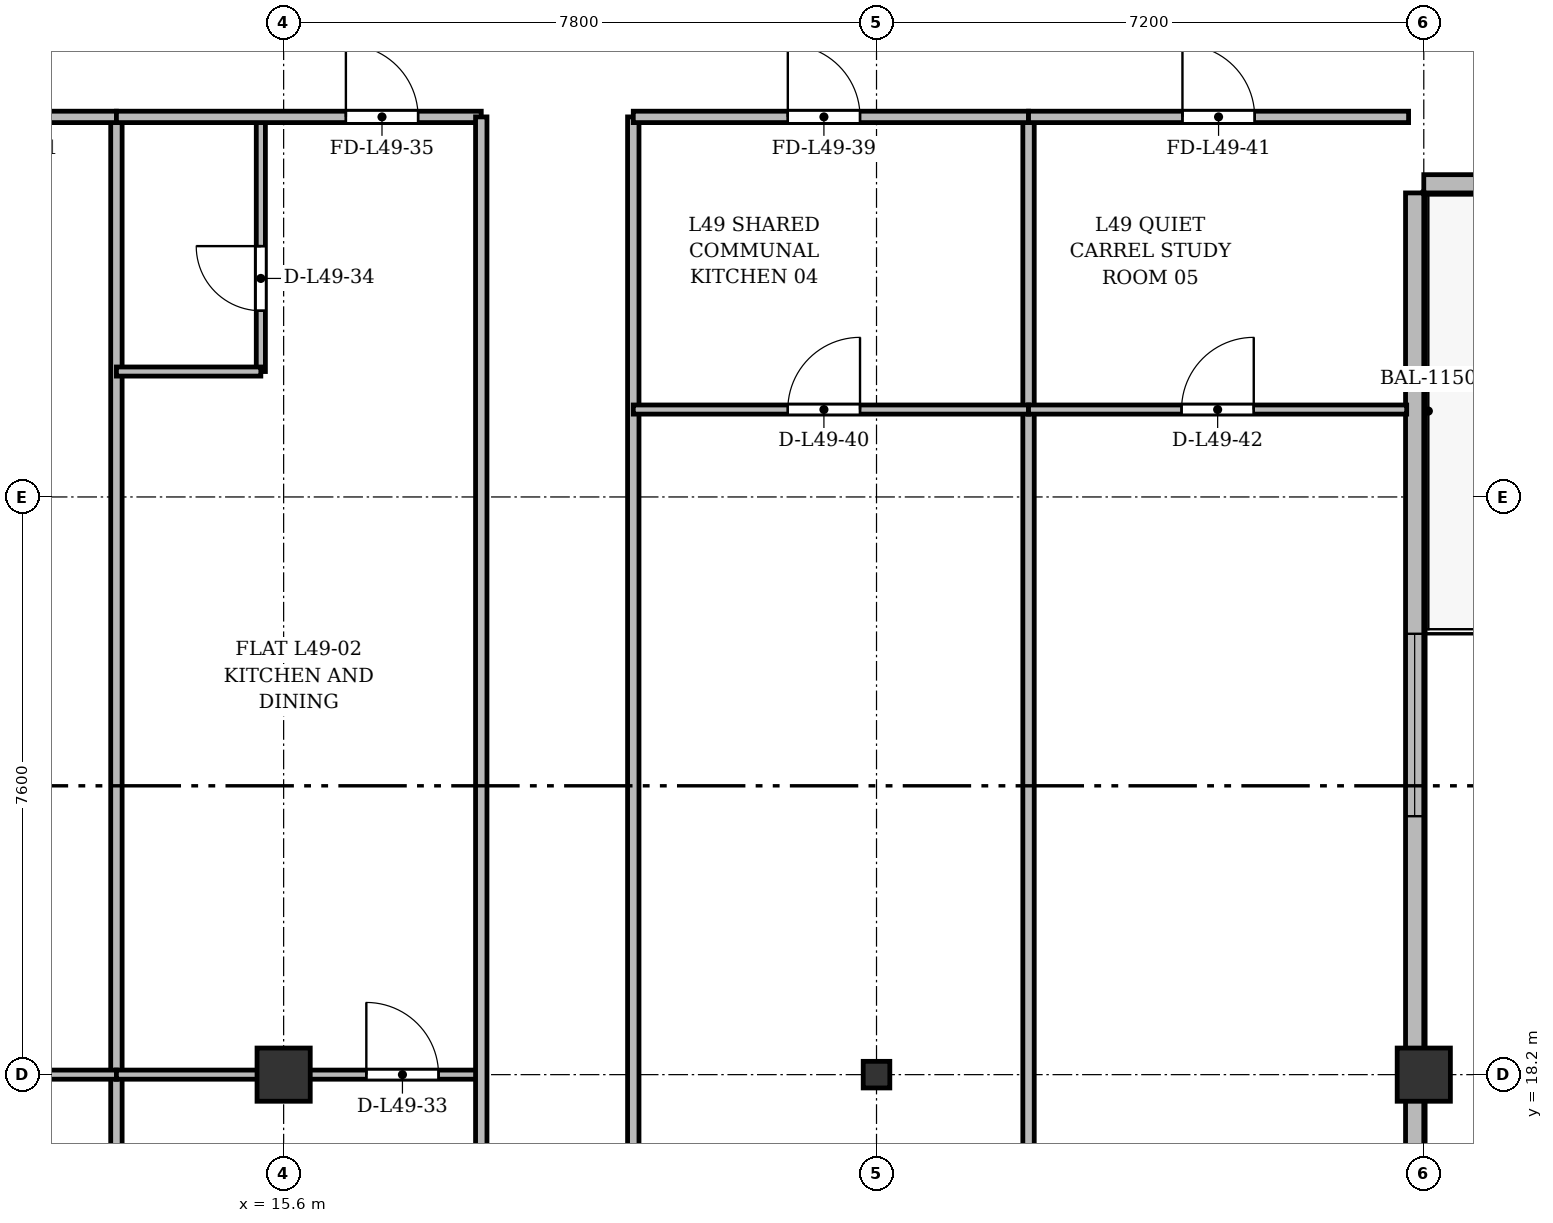
"""IFC4 building model, lengths in metres.
Left out: names, types, materials, properties, quantities, classifications, styles, units other than length and angle.
Written with IfcOpenShell. Run it as: python <this file> out.ifc"""

import sys

from ifc_helpers import new_model, si_unit, direction, frame, frame_2d, origin, origin_2d, place, context, subcontext, project, spatial, rectangle, i_section, extrude, source, transform, mapped, element, fill, save


model = new_model("IFC4")
c1 = context("Model", 3, precision=1e-05, world=origin(), true_north=direction((0.0, 1.0)))
c2 = subcontext(c1, "Body", "Model", "MODEL_VIEW")
j1 = project(units=[si_unit("LENGTHUNIT", "METRE"), si_unit("PLANEANGLEUNIT", "RADIAN")], contexts=[c1])
p1 = place(None, origin())
s1 = spatial("IfcSite", under=j1, at=p1, CompositionType="ELEMENT")
p2 = place(p1, origin())
s2 = spatial("IfcBuilding", under=s1, at=p2, CompositionType="ELEMENT")
p3 = place(p2, frame((0.0, 0.0, 190.5)))
s3 = spatial("IfcBuildingStorey", under=s2, at=p3, CompositionType="ELEMENT", Elevation=190.5)
m1 = source(origin(), c2, "Body", "SweptSolid", [
    extrude(rectangle(XDim=0.7, YDim=0.7, at=origin_2d()), origin(), (0.0, 0.0, 1.0), 3.6),
])
p4 = place(p3, frame((15.6, 18.2, 0.0), z_axis=(0.0, 0.0, 1.0), x_axis=(1.0, 0.0, 0.0)))
e1 = element("IfcColumn", 1, at=p4, inside=s3, PredefinedType="COLUMN", context=c2, shape_type="MappedRepresentation", body=[
    mapped(m1, transform((0.0, 0.0, 0.0), x_axis=(1.0, 0.0, 0.0), y_axis=(0.0, 1.0, 0.0), z_axis=(0.0, 0.0, 1.0), scale=1.0)),
])
m2 = source(origin(), c2, "Body", "SweptSolid", [
    extrude(i_section(OverallWidth=0.35, OverallDepth=0.35, WebThickness=0.018, FlangeThickness=0.028, at=origin_2d()), origin(), (0.0, 0.0, 1.0), 3.6),
])
p5 = place(p3, frame((23.4, 18.2, 0.0), z_axis=(0.0, 0.0, 1.0), x_axis=(1.0, 0.0, 0.0)))
e2 = element("IfcColumn", 2, at=p5, inside=s3, PredefinedType="COLUMN", context=c2, shape_type="MappedRepresentation", body=[
    mapped(m2, transform((0.0, 0.0, 0.0), x_axis=(1.0, 0.0, 0.0), y_axis=(0.0, 1.0, 0.0), z_axis=(0.0, 0.0, 1.0), scale=1.0)),
])
p6 = place(p3, frame((30.6, 18.2, 0.0), z_axis=(0.0, 0.0, 1.0), x_axis=(1.0, 0.0, 0.0)))
e3 = element("IfcColumn", 3, at=p6, inside=s3, PredefinedType="COLUMN", context=c2, shape_type="MappedRepresentation", body=[
    mapped(m1, transform((0.0, 0.0, 0.0), x_axis=(1.0, 0.0, 0.0), y_axis=(0.0, 1.0, 0.0), z_axis=(0.0, 0.0, 1.0), scale=1.0)),
])
p7 = place(p3, frame((43.8, 29.92, 0.0), z_axis=(0.0, 0.0, 1.0), x_axis=(-1.0, 0.0, 0.0)))
e4 = element("IfcWall", 4, at=p7, inside=s3, PredefinedType="SOLIDWALL", context=c2, shape_type="SweptSolid", body=[
    extrude(rectangle(XDim=13.2, YDim=0.24, at=frame_2d((6.6, 0.0))), origin(), (0.0, 0.0, 1.0), 2.86),
])
p8 = place(p7, frame((6.0, 0.0, 0.0)))
e5 = element("IfcOpeningElement", 5, at=p8, cuts=e4, PredefinedType="OPENING", context=c2, shape_type="SweptSolid", body=[
    extrude(rectangle(XDim=1.2, YDim=2.2, at=frame_2d((0.6, 1.1))), frame((0.0, 0.13, 0.0), z_axis=(0.0, -1.0, 0.0), x_axis=(1.0, 0.0, 0.0)), (0.0, 0.0, 1.0), 0.26),
])
p9 = place(p3, frame((30.48, 29.8, 0.0), z_axis=(0.0, 0.0, 1.0), x_axis=(0.0, -1.0, 0.0)))
e6 = element("IfcWall", 6, at=p9, inside=s3, PredefinedType="SOLIDWALL", context=c2, shape_type="SweptSolid", body=[
    extrude(rectangle(XDim=26.4, YDim=0.24, at=frame_2d((13.2, 0.0))), origin(), (0.0, 0.0, 1.0), 2.86),
])
p10 = place(p9, frame((20.75, 0.0, 0.92)))
e7 = element("IfcOpeningElement", 7, at=p10, cuts=e6, PredefinedType="OPENING", context=c2, shape_type="SweptSolid", body=[
    extrude(rectangle(XDim=1.2, YDim=1.65, at=frame_2d((0.6, 0.825))), frame((0.0, 0.13, 0.0), z_axis=(0.0, -1.0, 0.0), x_axis=(1.0, 0.0, 0.0)), (0.0, 0.0, 1.0), 0.26),
])
p11 = place(p9, frame((17.2, 0.0, 0.92)))
e8 = element("IfcOpeningElement", 8, at=p11, cuts=e6, PredefinedType="OPENING", context=c2, shape_type="SweptSolid", body=[
    extrude(rectangle(XDim=2.4, YDim=1.84, at=frame_2d((1.2, 0.92))), frame((0.0, 0.13, 0.0), z_axis=(0.0, -1.0, 0.0), x_axis=(1.0, 0.0, 0.0)), (0.0, 0.0, 1.0), 0.26),
])
p12 = place(p9, frame((13.0, 0.0, 0.92)))
e9 = element("IfcOpeningElement", 9, at=p12, cuts=e6, PredefinedType="OPENING", context=c2, shape_type="SweptSolid", body=[
    extrude(rectangle(XDim=2.4, YDim=1.84, at=frame_2d((1.2, 0.92))), frame((0.0, 0.13, 0.0), z_axis=(0.0, -1.0, 0.0), x_axis=(1.0, 0.0, 0.0)), (0.0, 0.0, 1.0), 0.26),
])
p13 = place(p9, frame((5.8, 0.0, 0.92)))
e10 = element("IfcOpeningElement", 10, at=p13, cuts=e6, PredefinedType="OPENING", context=c2, shape_type="SweptSolid", body=[
    extrude(rectangle(XDim=2.4, YDim=1.84, at=frame_2d((1.2, 0.92))), frame((0.0, 0.13, 0.0), z_axis=(0.0, -1.0, 0.0), x_axis=(1.0, 0.0, 0.0)), (0.0, 0.0, 1.0), 0.26),
])
for number, where, z_axis, x_axis in (
    (11, (13.4, 3.625, 0.0), (0.0, 0.0, 1.0), (0.0, 1.0, 0.0)),
    (12, (25.4, 3.625, 0.0), (0.0, 0.0, 1.0), (0.0, 1.0, 0.0)),
):
    element("IfcWall", number, at=place(p3, frame(where, z_axis=z_axis, x_axis=x_axis)), inside=s3, PredefinedType="PARTITIONING", context=c2, shape_type="SweptSolid", body=[
        extrude(rectangle(XDim=27.175, YDim=0.15, at=frame_2d((13.587, 0.0))), origin(), (0.0, 0.0, 1.0), 2.91),
    ])
p14 = place(p3, frame((8.24, 18.2, 0.0), z_axis=(0.0, 0.0, 1.0), x_axis=(1.0, 0.0, 0.0)))
e13 = element("IfcWall", 13, at=p14, inside=s3, PredefinedType="PARTITIONING", context=c2, shape_type="SweptSolid", body=[
    extrude(rectangle(XDim=5.16, YDim=0.12, at=frame_2d((2.58, 0.0))), origin(), (0.0, 0.0, 1.0), 2.91),
])
p15 = place(p14, frame((2.014, 0.0, 0.0)))
e14 = element("IfcOpeningElement", 14, at=p15, cuts=e13, PredefinedType="OPENING", context=c2, shape_type="SweptSolid", body=[
    extrude(rectangle(XDim=0.95, YDim=2.15, at=frame_2d((0.475, 1.075))), frame((0.0, 0.07, 0.0), z_axis=(0.0, -1.0, 0.0), x_axis=(1.0, 0.0, 0.0)), (0.0, 0.0, 1.0), 0.14),
])
p16 = place(p3, frame((8.225, 30.8, 0.0), z_axis=(0.0, 0.0, 1.0), x_axis=(1.0, 0.0, 0.0)))
e15 = element("IfcWall", 15, at=p16, inside=s3, PredefinedType="PARTITIONING", context=c2, shape_type="SweptSolid", body=[
    extrude(rectangle(XDim=5.175, YDim=0.15, at=frame_2d((2.587, 0.0))), origin(), (0.0, 0.0, 1.0), 2.86),
])
p17 = place(p16, frame((3.244, 0.0, 0.0)))
e16 = element("IfcOpeningElement", 16, at=p17, cuts=e15, PredefinedType="OPENING", context=c2, shape_type="SweptSolid", body=[
    extrude(rectangle(XDim=0.95, YDim=2.15, at=frame_2d((0.475, 1.075))), frame((0.0, 0.085, 0.0), z_axis=(0.0, -1.0, 0.0), x_axis=(1.0, 0.0, 0.0)), (0.0, 0.0, 1.0), 0.17),
])
p18 = place(p3, frame((13.4, 18.2, 0.0), z_axis=(0.0, 0.0, 1.0), x_axis=(1.0, 0.0, 0.0)))
e17 = element("IfcWall", 17, at=p18, inside=s3, PredefinedType="PARTITIONING", context=c2, shape_type="SweptSolid", body=[
    extrude(rectangle(XDim=4.8, YDim=0.12, at=frame_2d((2.4, 0.0))), origin(), (0.0, 0.0, 1.0), 2.91),
])
p19 = place(p18, frame((3.288, 0.0, 0.0)))
e18 = element("IfcOpeningElement", 18, at=p19, cuts=e17, PredefinedType="OPENING", context=c2, shape_type="SweptSolid", body=[
    extrude(rectangle(XDim=0.95, YDim=2.15, at=frame_2d((0.475, 1.075))), frame((0.0, 0.07, 0.0), z_axis=(0.0, -1.0, 0.0), x_axis=(1.0, 0.0, 0.0)), (0.0, 0.0, 1.0), 0.14),
])
p20 = place(p3, frame((15.3, 27.45, 0.0), z_axis=(0.0, 0.0, 1.0), x_axis=(0.0, 1.0, 0.0)))
e19 = element("IfcWall", 19, at=p20, inside=s3, PredefinedType="PARTITIONING", context=c2, shape_type="SweptSolid", body=[
    extrude(rectangle(XDim=3.35, YDim=0.12, at=frame_2d((1.675, 0.0))), origin(), (0.0, 0.0, 1.0), 3.36),
])
p21 = place(p20, frame((0.8, 0.0, 0.0)))
e20 = element("IfcOpeningElement", 20, at=p21, cuts=e19, PredefinedType="OPENING", context=c2, shape_type="SweptSolid", body=[
    extrude(rectangle(XDim=0.85, YDim=2.1, at=frame_2d((0.425, 1.05))), frame((0.0, 0.07, 0.0), z_axis=(0.0, -1.0, 0.0), x_axis=(1.0, 0.0, 0.0)), (0.0, 0.0, 1.0), 0.14),
])
p22 = place(p3, frame((13.4, 27.45, 0.0), z_axis=(0.0, 0.0, 1.0), x_axis=(1.0, 0.0, 0.0)))
e21 = element("IfcWall", 21, at=p22, inside=s3, PredefinedType="PARTITIONING", context=c2, shape_type="SweptSolid", body=[
    extrude(rectangle(XDim=1.9, YDim=0.12, at=frame_2d((0.95, 0.0))), origin(), (0.0, 0.0, 1.0), 3.36),
])
p23 = place(p3, frame((13.4, 30.8, 0.0), z_axis=(0.0, 0.0, 1.0), x_axis=(1.0, 0.0, 0.0)))
e22 = element("IfcWall", 22, at=p23, inside=s3, PredefinedType="PARTITIONING", context=c2, shape_type="SweptSolid", body=[
    extrude(rectangle(XDim=4.8, YDim=0.15, at=frame_2d((2.4, 0.0))), origin(), (0.0, 0.0, 1.0), 2.86),
])
p24 = place(p23, frame((3.019, 0.0, 0.0)))
e23 = element("IfcOpeningElement", 23, at=p24, cuts=e22, PredefinedType="OPENING", context=c2, shape_type="SweptSolid", body=[
    extrude(rectangle(XDim=0.95, YDim=2.15, at=frame_2d((0.475, 1.075))), frame((0.0, 0.085, 0.0), z_axis=(0.0, -1.0, 0.0), x_axis=(1.0, 0.0, 0.0)), (0.0, 0.0, 1.0), 0.17),
])
for number, where, z_axis, x_axis in (
    (24, (18.2, 3.625, 0.0), (0.0, 0.0, 1.0), (0.0, 1.0, 0.0)),
    (25, (20.2, 3.625, 0.0), (0.0, 0.0, 1.0), (0.0, 1.0, 0.0)),
):
    element("IfcWall", number, at=place(p3, frame(where, z_axis=z_axis, x_axis=x_axis)), inside=s3, PredefinedType="PARTITIONING", context=c2, shape_type="SweptSolid", body=[
        extrude(rectangle(XDim=27.175, YDim=0.15, at=frame_2d((13.587, 0.0))), origin(), (0.0, 0.0, 1.0), 2.91),
    ])
p25 = place(p3, frame((20.2, 30.8, 0.0), z_axis=(0.0, 0.0, 1.0), x_axis=(1.0, 0.0, 0.0)))
e26 = element("IfcWall", 26, at=p25, inside=s3, PredefinedType="PARTITIONING", context=c2, shape_type="SweptSolid", body=[
    extrude(rectangle(XDim=5.2, YDim=0.15, at=frame_2d((2.6, 0.0))), origin(), (0.0, 0.0, 1.0), 2.86),
])
p26 = place(p25, frame((2.033, 0.0, 0.0)))
e27 = element("IfcOpeningElement", 27, at=p26, cuts=e26, PredefinedType="OPENING", context=c2, shape_type="SweptSolid", body=[
    extrude(rectangle(XDim=0.95, YDim=2.15, at=frame_2d((0.475, 1.075))), frame((0.0, 0.085, 0.0), z_axis=(0.0, -1.0, 0.0), x_axis=(1.0, 0.0, 0.0)), (0.0, 0.0, 1.0), 0.17),
])
p27 = place(p3, frame((20.2, 26.95, 0.0), z_axis=(0.0, 0.0, 1.0), x_axis=(1.0, 0.0, 0.0)))
e28 = element("IfcWall", 28, at=p27, inside=s3, PredefinedType="PARTITIONING", context=c2, shape_type="SweptSolid", body=[
    extrude(rectangle(XDim=5.2, YDim=0.12, at=frame_2d((2.6, 0.0))), origin(), (0.0, 0.0, 1.0), 2.86),
])
p28 = place(p27, frame((2.033, 0.0, 0.0)))
e29 = element("IfcOpeningElement", 29, at=p28, cuts=e28, PredefinedType="OPENING", context=c2, shape_type="SweptSolid", body=[
    extrude(rectangle(XDim=0.95, YDim=2.15, at=frame_2d((0.475, 1.075))), frame((0.0, 0.07, 0.0), z_axis=(0.0, -1.0, 0.0), x_axis=(1.0, 0.0, 0.0)), (0.0, 0.0, 1.0), 0.14),
])
p29 = place(p3, frame((25.4, 30.8, 0.0), z_axis=(0.0, 0.0, 1.0), x_axis=(1.0, 0.0, 0.0)))
e30 = element("IfcWall", 30, at=p29, inside=s3, PredefinedType="PARTITIONING", context=c2, shape_type="SweptSolid", body=[
    extrude(rectangle(XDim=5.0, YDim=0.15, at=frame_2d((2.5, 0.0))), origin(), (0.0, 0.0, 1.0), 3.36),
])
p30 = place(p29, frame((2.025, 0.0, 0.0)))
e31 = element("IfcOpeningElement", 31, at=p30, cuts=e30, PredefinedType="OPENING", context=c2, shape_type="SweptSolid", body=[
    extrude(rectangle(XDim=0.95, YDim=2.15, at=frame_2d((0.475, 1.075))), frame((0.0, 0.085, 0.0), z_axis=(0.0, -1.0, 0.0), x_axis=(1.0, 0.0, 0.0)), (0.0, 0.0, 1.0), 0.17),
])
p31 = place(p3, frame((25.4, 26.95, 0.0), z_axis=(0.0, 0.0, 1.0), x_axis=(1.0, 0.0, 0.0)))
e32 = element("IfcWall", 32, at=p31, inside=s3, PredefinedType="PARTITIONING", context=c2, shape_type="SweptSolid", body=[
    extrude(rectangle(XDim=4.975, YDim=0.12, at=frame_2d((2.488, 0.0))), origin(), (0.0, 0.0, 1.0), 3.36),
])
p32 = place(p31, frame((2.013, 0.0, 0.0)))
e33 = element("IfcOpeningElement", 33, at=p32, cuts=e32, PredefinedType="OPENING", context=c2, shape_type="SweptSolid", body=[
    extrude(rectangle(XDim=0.95, YDim=2.15, at=frame_2d((0.475, 1.075))), frame((0.0, 0.07, 0.0), z_axis=(0.0, -1.0, 0.0), x_axis=(1.0, 0.0, 0.0)), (0.0, 0.0, 1.0), 0.14),
])
m3 = source(origin(), c2, "Body", "SweptSolid", [
    extrude(rectangle(XDim=2.4, YDim=1.84, at=frame_2d((1.2, 0.92))), frame((0.0, 0.03, 0.0), z_axis=(0.0, -1.0, 0.0), x_axis=(1.0, 0.0, 0.0)), (0.0, 0.0, 1.0), 0.06),
])
p33 = place(p13, origin())
e34 = element("IfcWindow", 34, at=p33, inside=s3, PartitioningType="SINGLE_PANEL", PredefinedType="WINDOW", context=c2, shape_type="MappedRepresentation", body=[
    mapped(m3, transform((0.0, 0.0, 0.0), x_axis=(1.0, 0.0, 0.0), y_axis=(0.0, 1.0, 0.0), z_axis=(0.0, 0.0, 1.0), scale=1.0)),
])
fill(e10, e34)
m4 = source(origin(), c2, "Body", "SweptSolid", [
    extrude(rectangle(XDim=0.95, YDim=2.15, at=frame_2d((0.475, 1.075))), frame((0.0, 0.025, 0.0), z_axis=(0.0, -1.0, 0.0), x_axis=(1.0, 0.0, 0.0)), (0.0, 0.0, 1.0), 0.05),
])
p34 = place(p19, origin())
e35 = element("IfcDoor", 35, at=p34, inside=s3, OperationType="SINGLE_SWING_LEFT", PredefinedType="DOOR", context=c2, shape_type="MappedRepresentation", body=[
    mapped(m4, transform((0.0, 0.0, 0.0), x_axis=(1.0, 0.0, 0.0), y_axis=(0.0, 1.0, 0.0), z_axis=(0.0, 0.0, 1.0), scale=1.0)),
])
fill(e18, e35)
m5 = source(origin(), c2, "Body", "SweptSolid", [
    extrude(rectangle(XDim=0.85, YDim=2.1, at=frame_2d((0.425, 1.05))), frame((0.0, 0.025, 0.0), z_axis=(0.0, -1.0, 0.0), x_axis=(1.0, 0.0, 0.0)), (0.0, 0.0, 1.0), 0.05),
])
p35 = place(p21, origin())
e36 = element("IfcDoor", 36, at=p35, inside=s3, OperationType="SINGLE_SWING_RIGHT", PredefinedType="DOOR", context=c2, shape_type="MappedRepresentation", body=[
    mapped(m5, transform((0.0, 0.0, 0.0), x_axis=(1.0, 0.0, 0.0), y_axis=(0.0, 1.0, 0.0), z_axis=(0.0, 0.0, 1.0), scale=1.0)),
])
fill(e20, e36)
p36 = place(p24, origin())
e37 = element("IfcDoor", 37, at=p36, inside=s3, OperationType="SINGLE_SWING_LEFT", PredefinedType="DOOR", context=c2, shape_type="MappedRepresentation", body=[
    mapped(m4, transform((0.0, 0.0, 0.0), x_axis=(1.0, 0.0, 0.0), y_axis=(0.0, 1.0, 0.0), z_axis=(0.0, 0.0, 1.0), scale=1.0)),
])
fill(e23, e37)
p37 = place(p26, origin())
e38 = element("IfcDoor", 38, at=p37, inside=s3, OperationType="SINGLE_SWING_LEFT", PredefinedType="DOOR", context=c2, shape_type="MappedRepresentation", body=[
    mapped(m4, transform((0.0, 0.0, 0.0), x_axis=(1.0, 0.0, 0.0), y_axis=(0.0, 1.0, 0.0), z_axis=(0.0, 0.0, 1.0), scale=1.0)),
])
fill(e27, e38)
p38 = place(p28, origin())
e39 = element("IfcDoor", 39, at=p38, inside=s3, OperationType="SINGLE_SWING_RIGHT", PredefinedType="DOOR", context=c2, shape_type="MappedRepresentation", body=[
    mapped(m4, transform((0.0, 0.0, 0.0), x_axis=(1.0, 0.0, 0.0), y_axis=(0.0, 1.0, 0.0), z_axis=(0.0, 0.0, 1.0), scale=1.0)),
])
fill(e29, e39)
p39 = place(p30, origin())
e40 = element("IfcDoor", 40, at=p39, inside=s3, OperationType="SINGLE_SWING_LEFT", PredefinedType="DOOR", context=c2, shape_type="MappedRepresentation", body=[
    mapped(m4, transform((0.0, 0.0, 0.0), x_axis=(1.0, 0.0, 0.0), y_axis=(0.0, 1.0, 0.0), z_axis=(0.0, 0.0, 1.0), scale=1.0)),
])
fill(e31, e40)
p40 = place(p32, origin())
e41 = element("IfcDoor", 41, at=p40, inside=s3, OperationType="SINGLE_SWING_RIGHT", PredefinedType="DOOR", context=c2, shape_type="MappedRepresentation", body=[
    mapped(m4, transform((0.0, 0.0, 0.0), x_axis=(1.0, 0.0, 0.0), y_axis=(0.0, 1.0, 0.0), z_axis=(0.0, 0.0, 1.0), scale=1.0)),
])
fill(e33, e41)
save(model, sys.argv[1])
